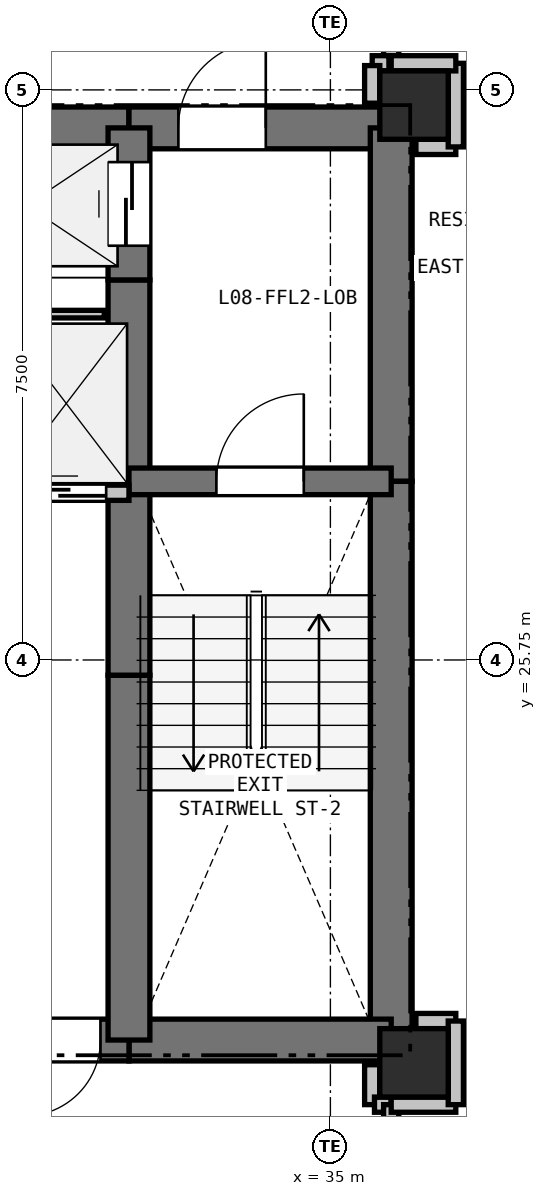
"""IFC4 building model, lengths in metres.
Left out: names, types, materials, properties, quantities, classifications, styles, units other than length and angle.
Written with IfcOpenShell. Run it as: python <this file> out.ifc"""

import sys

from ifc_helpers import new_model, si_unit, direction, frame, frame_2d, origin, origin_2d, place, context, subcontext, project, spatial, rectangle, extrude, element, fill, save


model = new_model("IFC4")
c1 = context("Model", 3, precision=1e-05, world=origin(), true_north=direction((0.0, 1.0)))
c2 = subcontext(c1, "Body", "Model", "MODEL_VIEW")
j1 = project(units=[si_unit("LENGTHUNIT", "METRE"), si_unit("PLANEANGLEUNIT", "RADIAN")], contexts=[c1])
p1 = place(None, origin())
s1 = spatial("IfcSite", under=j1, at=p1, CompositionType="ELEMENT")
p2 = place(p1, origin())
s2 = spatial("IfcBuilding", under=s1, at=p2, CompositionType="ELEMENT")
p3 = place(p2, frame((0.0, 0.0, 32.4)))
s3 = spatial("IfcBuildingStorey", under=s2, at=p3, CompositionType="ELEMENT", Elevation=32.4)
for number, where, z_axis, x_axis in (
    (1, (36.1, 33.05, 0.0), (0.0, 0.0, 1.0), (1.0, 0.0, 0.0)),
    (2, (36.1, 20.45, 0.0), (0.0, 0.0, 1.0), (1.0, 0.0, 0.0)),
):
    element("IfcColumn", number, at=place(p3, frame(where, z_axis=z_axis, x_axis=x_axis)), inside=s3, PredefinedType="COLUMN", context=c2, shape_type="SweptSolid", body=[
        extrude(rectangle(XDim=0.9, YDim=0.9, at=origin_2d()), origin(), (0.0, 0.0, 1.0), 3.3),
    ])
p4 = place(p3, frame((29.65, 32.75, 0.0), z_axis=(0.0, 0.0, 1.0), x_axis=(1.0, 0.0, 0.0)))
e3 = element("IfcWall", 3, at=p4, inside=s3, PredefinedType="SHEAR", context=c2, shape_type="SweptSolid", body=[
    extrude(rectangle(XDim=2.7, YDim=0.55, at=frame_2d((1.35, 0.0))), origin(), (0.0, 0.0, 1.0), 3.04),
])
p5 = place(p3, frame((32.35, 32.75, 0.0), z_axis=(0.0, 0.0, 1.0), x_axis=(1.0, 0.0, 0.0)))
e4 = element("IfcWall", 4, at=p5, inside=s3, PredefinedType="SHEAR", context=c2, shape_type="SweptSolid", body=[
    extrude(rectangle(XDim=3.45, YDim=0.55, at=frame_2d((1.725, 0.0))), origin(), (0.0, 0.0, 1.0), 3.04),
])
p6 = place(p5, frame((0.65, 0.0, 0.0)))
e5 = element("IfcOpeningElement", 5, at=p6, cuts=e4, PredefinedType="OPENING", context=c2, shape_type="SweptSolid", body=[
    extrude(rectangle(XDim=1.15, YDim=2.15, at=frame_2d((0.575, 1.075))), frame((0.0, 0.285, 0.0), z_axis=(0.0, -1.0, 0.0), x_axis=(1.0, 0.0, 0.0)), (0.0, 0.0, 1.0), 0.57),
])
p7 = place(p3, frame((35.8, 32.75, 0.0), z_axis=(0.0, 0.0, 1.0), x_axis=(0.0, -1.0, 0.0)))
e6 = element("IfcWall", 6, at=p7, inside=s3, PredefinedType="SHEAR", context=c2, shape_type="SweptSolid", body=[
    extrude(rectangle(XDim=4.65, YDim=0.55, at=frame_2d((2.325, 0.0))), origin(), (0.0, 0.0, 1.0), 3.04),
])
p8 = place(p3, frame((35.8, 28.1, 0.0), z_axis=(0.0, 0.0, 1.0), x_axis=(0.0, -1.0, 0.0)))
e7 = element("IfcWall", 7, at=p8, inside=s3, PredefinedType="SHEAR", context=c2, shape_type="SweptSolid", body=[
    extrude(rectangle(XDim=7.35, YDim=0.55, at=frame_2d((3.675, 0.0))), origin(), (0.0, 0.0, 1.0), 3.04),
])
p9 = place(p3, frame((35.8, 20.75, 0.0), z_axis=(0.0, 0.0, 1.0), x_axis=(-1.0, 0.0, 0.0)))
e8 = element("IfcWall", 8, at=p9, inside=s3, PredefinedType="SHEAR", context=c2, shape_type="SweptSolid", body=[
    extrude(rectangle(XDim=3.45, YDim=0.55, at=frame_2d((1.725, 0.0))), origin(), (0.0, 0.0, 1.0), 3.04),
])
p10 = place(p3, frame((32.35, 20.75, 0.0), z_axis=(0.0, 0.0, 1.0), x_axis=(-1.0, 0.0, 0.0)))
e9 = element("IfcWall", 9, at=p10, inside=s3, PredefinedType="SHEAR", context=c2, shape_type="SweptSolid", body=[
    extrude(rectangle(XDim=1.75, YDim=0.55, at=frame_2d((0.875, 0.0))), origin(), (0.0, 0.0, 1.0), 3.04),
])
p11 = place(p10, frame((0.375, 0.0, 0.0)))
e10 = element("IfcOpeningElement", 10, at=p11, cuts=e9, PredefinedType="OPENING", context=c2, shape_type="SweptSolid", body=[
    extrude(rectangle(XDim=1.0, YDim=2.15, at=frame_2d((0.5, 1.075))), frame((0.0, 0.285, 0.0), z_axis=(0.0, -1.0, 0.0), x_axis=(1.0, 0.0, 0.0)), (0.0, 0.0, 1.0), 0.57),
])
p12 = place(p3, frame((32.35, 20.75, 0.0), z_axis=(0.0, 0.0, 1.0), x_axis=(0.0, 1.0, 0.0)))
e11 = element("IfcWall", 11, at=p12, inside=s3, PredefinedType="SHEAR", context=c2, shape_type="SweptSolid", body=[
    extrude(rectangle(XDim=4.8, YDim=0.55, at=frame_2d((2.4, 0.0))), origin(), (0.0, 0.0, 1.0), 3.04),
])
p13 = place(p3, frame((32.35, 25.55, 0.0), z_axis=(0.0, 0.0, 1.0), x_axis=(0.0, 1.0, 0.0)))
e12 = element("IfcWall", 12, at=p13, inside=s3, PredefinedType="SHEAR", context=c2, shape_type="SweptSolid", body=[
    extrude(rectangle(XDim=2.4, YDim=0.55, at=frame_2d((1.2, 0.0))), origin(), (0.0, 0.0, 1.0), 3.04),
])
p14 = place(p3, frame((32.35, 27.95, 0.0), z_axis=(0.0, 0.0, 1.0), x_axis=(0.0, 1.0, 0.0)))
e13 = element("IfcWall", 13, at=p14, inside=s3, PredefinedType="SHEAR", context=c2, shape_type="SweptSolid", body=[
    extrude(rectangle(XDim=2.8, YDim=0.55, at=frame_2d((1.4, 0.0))), origin(), (0.0, 0.0, 1.0), 3.04),
])
p15 = place(p3, frame((32.35, 30.75, 0.0), z_axis=(0.0, 0.0, 1.0), x_axis=(0.0, 1.0, 0.0)))
e14 = element("IfcWall", 14, at=p15, inside=s3, PredefinedType="SHEAR", context=c2, shape_type="SweptSolid", body=[
    extrude(rectangle(XDim=2.0, YDim=0.55, at=frame_2d((1.0, 0.0))), origin(), (0.0, 0.0, 1.0), 3.04),
])
p16 = place(p15, frame((0.45, 0.0, 0.0)))
e15 = element("IfcOpeningElement", 15, at=p16, cuts=e14, PredefinedType="OPENING", context=c2, shape_type="SweptSolid", body=[
    extrude(rectangle(XDim=1.1, YDim=2.15, at=frame_2d((0.55, 1.075))), frame((0.0, 0.285, 0.0), z_axis=(0.0, -1.0, 0.0), x_axis=(1.0, 0.0, 0.0)), (0.0, 0.0, 1.0), 0.57),
])
p17 = place(p3, frame((32.35, 28.1, 0.0), z_axis=(0.0, 0.0, 1.0), x_axis=(1.0, 0.0, 0.0)))
e16 = element("IfcWall", 16, at=p17, inside=s3, PredefinedType="SHEAR", context=c2, shape_type="SweptSolid", body=[
    extrude(rectangle(XDim=3.45, YDim=0.35, at=frame_2d((1.725, 0.0))), origin(), (0.0, 0.0, 1.0), 3.04),
])
p18 = place(p17, frame((1.15, 0.0, 0.0)))
e17 = element("IfcOpeningElement", 17, at=p18, cuts=e16, PredefinedType="OPENING", context=c2, shape_type="SweptSolid", body=[
    extrude(rectangle(XDim=1.15, YDim=2.15, at=frame_2d((0.575, 1.075))), frame((0.0, 0.185, 0.0), z_axis=(0.0, -1.0, 0.0), x_axis=(1.0, 0.0, 0.0)), (0.0, 0.0, 1.0), 0.37),
])
p19 = place(p3, frame((27.4, 27.95, 0.0), z_axis=(0.0, 0.0, 1.0), x_axis=(1.0, 0.0, 0.0)))
e18 = element("IfcWall", 18, at=p19, inside=s3, PredefinedType="PARTITIONING", context=c2, shape_type="SweptSolid", body=[
    extrude(rectangle(XDim=4.95, YDim=0.2, at=frame_2d((2.475, 0.0))), origin(), (0.0, 0.0, 1.0), 3.04),
])
p20 = place(p19, frame((0.25, 0.0, 0.0)))
e19 = element("IfcOpeningElement", 19, at=p20, cuts=e18, PredefinedType="OPENING", context=c2, shape_type="SweptSolid", body=[
    extrude(rectangle(XDim=1.1, YDim=2.15, at=frame_2d((0.55, 1.075))), frame((0.0, 0.11, 0.0), z_axis=(0.0, -1.0, 0.0), x_axis=(1.0, 0.0, 0.0)), (0.0, 0.0, 1.0), 0.22),
])
p21 = place(p19, frame((1.9, 0.0, 0.0)))
e20 = element("IfcOpeningElement", 20, at=p21, cuts=e18, PredefinedType="OPENING", context=c2, shape_type="SweptSolid", body=[
    extrude(rectangle(XDim=1.1, YDim=2.15, at=frame_2d((0.55, 1.075))), frame((0.0, 0.11, 0.0), z_axis=(0.0, -1.0, 0.0), x_axis=(1.0, 0.0, 0.0)), (0.0, 0.0, 1.0), 0.22),
])
p22 = place(p19, frame((3.55, 0.0, 0.0)))
e21 = element("IfcOpeningElement", 21, at=p22, cuts=e18, PredefinedType="OPENING", context=c2, shape_type="SweptSolid", body=[
    extrude(rectangle(XDim=1.1, YDim=2.15, at=frame_2d((0.55, 1.075))), frame((0.0, 0.11, 0.0), z_axis=(0.0, -1.0, 0.0), x_axis=(1.0, 0.0, 0.0)), (0.0, 0.0, 1.0), 0.22),
])
p23 = place(p3, frame((32.025, 30.3, 0.0), z_axis=(0.0, 0.0, 1.0), x_axis=(-1.0, 0.0, 0.0)))
e22 = element("IfcWall", 22, at=p23, inside=s3, PredefinedType="PARTITIONING", context=c2, shape_type="SweptSolid", body=[
    extrude(rectangle(XDim=1.325, YDim=0.1, at=frame_2d((0.663, 0.0))), origin(), (0.0, 0.0, 1.0), 3.04),
])
p24 = place(p3, frame((35.55, 20.425, 0.0), z_axis=(0.0, 0.0, 1.0), x_axis=(0.0, -1.0, 0.0)))
e23 = element("IfcWall", 23, at=p24, inside=s3, PredefinedType="PARTITIONING", context=c2, shape_type="SweptSolid", body=[
    extrude(rectangle(XDim=0.525, YDim=0.2, at=frame_2d((0.263, 0.0))), origin(), (0.0, 0.0, 1.0), 2.488),
])
p25 = place(p3, frame((35.58, 19.9, 0.0), z_axis=(0.0, 0.0, 1.0), x_axis=(1.0, 0.0, 0.0)))
e24 = element("IfcWall", 24, at=p25, inside=s3, PredefinedType="PARTITIONING", context=c2, shape_type="SweptSolid", body=[
    extrude(rectangle(XDim=0.22, YDim=0.2, at=frame_2d((0.11, 0.0))), origin(), (0.0, 0.0, 1.0), 3.04),
])
p26 = place(p3, frame((35.8, 19.9, 0.0), z_axis=(0.0, 0.0, 1.0), x_axis=(0.0, -1.0, 0.0)))
e25 = element("IfcWall", 25, at=p26, inside=s3, PredefinedType="PARTITIONING", context=c2, shape_type="SweptSolid", body=[
    extrude(rectangle(XDim=1.75, YDim=0.2, at=frame_2d((0.875, 0.0))), origin(), (0.0, 0.0, 1.0), 3.04),
])
p27 = place(p26, frame((0.375, 0.0, 0.0)))
e26 = element("IfcOpeningElement", 26, at=p27, cuts=e25, PredefinedType="OPENING", context=c2, shape_type="SweptSolid", body=[
    extrude(rectangle(XDim=1.0, YDim=2.15, at=frame_2d((0.5, 1.075))), frame((0.0, 0.11, 0.0), z_axis=(0.0, -1.0, 0.0), x_axis=(1.0, 0.0, 0.0)), (0.0, 0.0, 1.0), 0.22),
])
p28 = place(p3, frame((35.8, 35.35, 0.0), z_axis=(0.0, 0.0, 1.0), x_axis=(0.0, -1.0, 0.0)))
e27 = element("IfcWall", 27, at=p28, inside=s3, PredefinedType="PARTITIONING", context=c2, shape_type="SweptSolid", body=[
    extrude(rectangle(XDim=1.75, YDim=0.2, at=frame_2d((0.875, 0.0))), origin(), (0.0, 0.0, 1.0), 3.04),
])
p29 = place(p28, frame((0.375, 0.0, 0.0)))
e28 = element("IfcOpeningElement", 28, at=p29, cuts=e27, PredefinedType="OPENING", context=c2, shape_type="SweptSolid", body=[
    extrude(rectangle(XDim=1.0, YDim=2.15, at=frame_2d((0.5, 1.075))), frame((0.0, 0.11, 0.0), z_axis=(0.0, -1.0, 0.0), x_axis=(1.0, 0.0, 0.0)), (0.0, 0.0, 1.0), 0.22),
])
p30 = place(p3, frame((35.77, 33.6, 0.0), z_axis=(0.0, 0.0, 1.0), x_axis=(-1.0, 0.0, 0.0)))
e29 = element("IfcWall", 29, at=p30, inside=s3, PredefinedType="PARTITIONING", context=c2, shape_type="SweptSolid", body=[
    extrude(rectangle(XDim=0.22, YDim=0.2, at=frame_2d((0.11, 0.0))), origin(), (0.0, 0.0, 1.0), 3.04),
])
p31 = place(p3, frame((35.55, 33.57, 0.0), z_axis=(0.0, 0.0, 1.0), x_axis=(0.0, -1.0, 0.0)))
e30 = element("IfcWall", 30, at=p31, inside=s3, PredefinedType="PARTITIONING", context=c2, shape_type="SweptSolid", body=[
    extrude(rectangle(XDim=0.495, YDim=0.2, at=frame_2d((0.248, 0.0))), origin(), (0.0, 0.0, 1.0), 2.488),
])
for number, where, z_axis, x_axis in (
    (31, (36.65, 21.0, 0.0), (0.0, 0.0, 1.0), (-1.0, 0.0, 0.0)),
    (32, (36.125, 32.5, 0.0), (0.0, 0.0, 1.0), (1.0, 0.0, 0.0)),
):
    element("IfcWall", number, at=place(p3, frame(where, z_axis=z_axis, x_axis=x_axis)), inside=s3, PredefinedType="PARTITIONING", context=c2, shape_type="SweptSolid", body=[
        extrude(rectangle(XDim=0.525, YDim=0.2, at=frame_2d((0.262, 0.0))), origin(), (0.0, 0.0, 1.0), 2.488),
    ])
p32 = place(p3, frame((36.65, 32.5, 0.0), z_axis=(0.0, 0.0, 1.0), x_axis=(0.0, 1.0, 0.0)))
e33 = element("IfcWall", 33, at=p32, inside=s3, PredefinedType="PARTITIONING", context=c2, shape_type="SweptSolid", body=[
    extrude(rectangle(XDim=1.1, YDim=0.2, at=frame_2d((0.55, 0.0))), origin(), (0.0, 0.0, 1.0), 2.338),
])
for number, where, z_axis, x_axis in (
    (34, (36.65, 33.6, 0.0), (0.0, 0.0, 1.0), (-1.0, 0.0, 0.0)),
    (35, (35.8, 19.9, 0.0), (0.0, 0.0, 1.0), (1.0, 0.0, 0.0)),
):
    element("IfcWall", number, at=place(p3, frame(where, z_axis=z_axis, x_axis=x_axis)), inside=s3, PredefinedType="PARTITIONING", context=c2, shape_type="SweptSolid", body=[
        extrude(rectangle(XDim=0.85, YDim=0.2, at=frame_2d((0.425, 0.0))), origin(), (0.0, 0.0, 1.0), 2.338),
    ])
p33 = place(p3, frame((36.65, 19.9, 0.0), z_axis=(0.0, 0.0, 1.0), x_axis=(0.0, 1.0, 0.0)))
e36 = element("IfcWall", 36, at=p33, inside=s3, PredefinedType="PARTITIONING", context=c2, shape_type="SweptSolid", body=[
    extrude(rectangle(XDim=1.1, YDim=0.2, at=frame_2d((0.55, 0.0))), origin(), (0.0, 0.0, 1.0), 3.04),
])
p34 = place(p22, origin())
e37 = element("IfcDoor", 37, at=p34, inside=s3, OperationType="SLIDING_TO_LEFT", PredefinedType="DOOR", context=c2, shape_type="SweptSolid", body=[
    extrude(rectangle(XDim=1.1, YDim=2.15, at=frame_2d((0.55, 1.075))), frame((0.0, 0.025, 0.0), z_axis=(0.0, -1.0, 0.0), x_axis=(1.0, 0.0, 0.0)), (0.0, 0.0, 1.0), 0.05),
])
fill(e21, e37)
p35 = place(p11, origin())
e38 = element("IfcDoor", 38, at=p35, inside=s3, OperationType="SINGLE_SWING_RIGHT", PredefinedType="DOOR", context=c2, shape_type="SweptSolid", body=[
    extrude(rectangle(XDim=1.0, YDim=2.15, at=frame_2d((0.5, 1.075))), frame((0.0, 0.025, 0.0), z_axis=(0.0, -1.0, 0.0), x_axis=(1.0, 0.0, 0.0)), (0.0, 0.0, 1.0), 0.05),
])
fill(e10, e38)
p36 = place(p16, origin())
e39 = element("IfcDoor", 39, at=p36, inside=s3, OperationType="SLIDING_TO_LEFT", PredefinedType="DOOR", context=c2, shape_type="SweptSolid", body=[
    extrude(rectangle(XDim=1.1, YDim=2.15, at=frame_2d((0.55, 1.075))), frame((0.0, 0.025, 0.0), z_axis=(0.0, -1.0, 0.0), x_axis=(1.0, 0.0, 0.0)), (0.0, 0.0, 1.0), 0.05),
])
fill(e15, e39)
p37 = place(p18, origin())
e40 = element("IfcDoor", 40, at=p37, inside=s3, OperationType="SINGLE_SWING_RIGHT", PredefinedType="DOOR", context=c2, shape_type="SweptSolid", body=[
    extrude(rectangle(XDim=1.15, YDim=2.15, at=frame_2d((0.575, 1.075))), frame((0.0, 0.025, 0.0), z_axis=(0.0, -1.0, 0.0), x_axis=(1.0, 0.0, 0.0)), (0.0, 0.0, 1.0), 0.05),
])
fill(e17, e40)
p38 = place(p6, origin())
e41 = element("IfcDoor", 41, at=p38, inside=s3, OperationType="SINGLE_SWING_RIGHT", PredefinedType="DOOR", context=c2, shape_type="SweptSolid", body=[
    extrude(rectangle(XDim=1.15, YDim=2.15, at=frame_2d((0.575, 1.075))), frame((0.0, 0.025, 0.0), z_axis=(0.0, -1.0, 0.0), x_axis=(1.0, 0.0, 0.0)), (0.0, 0.0, 1.0), 0.05),
])
fill(e5, e41)
save(model, sys.argv[1])
